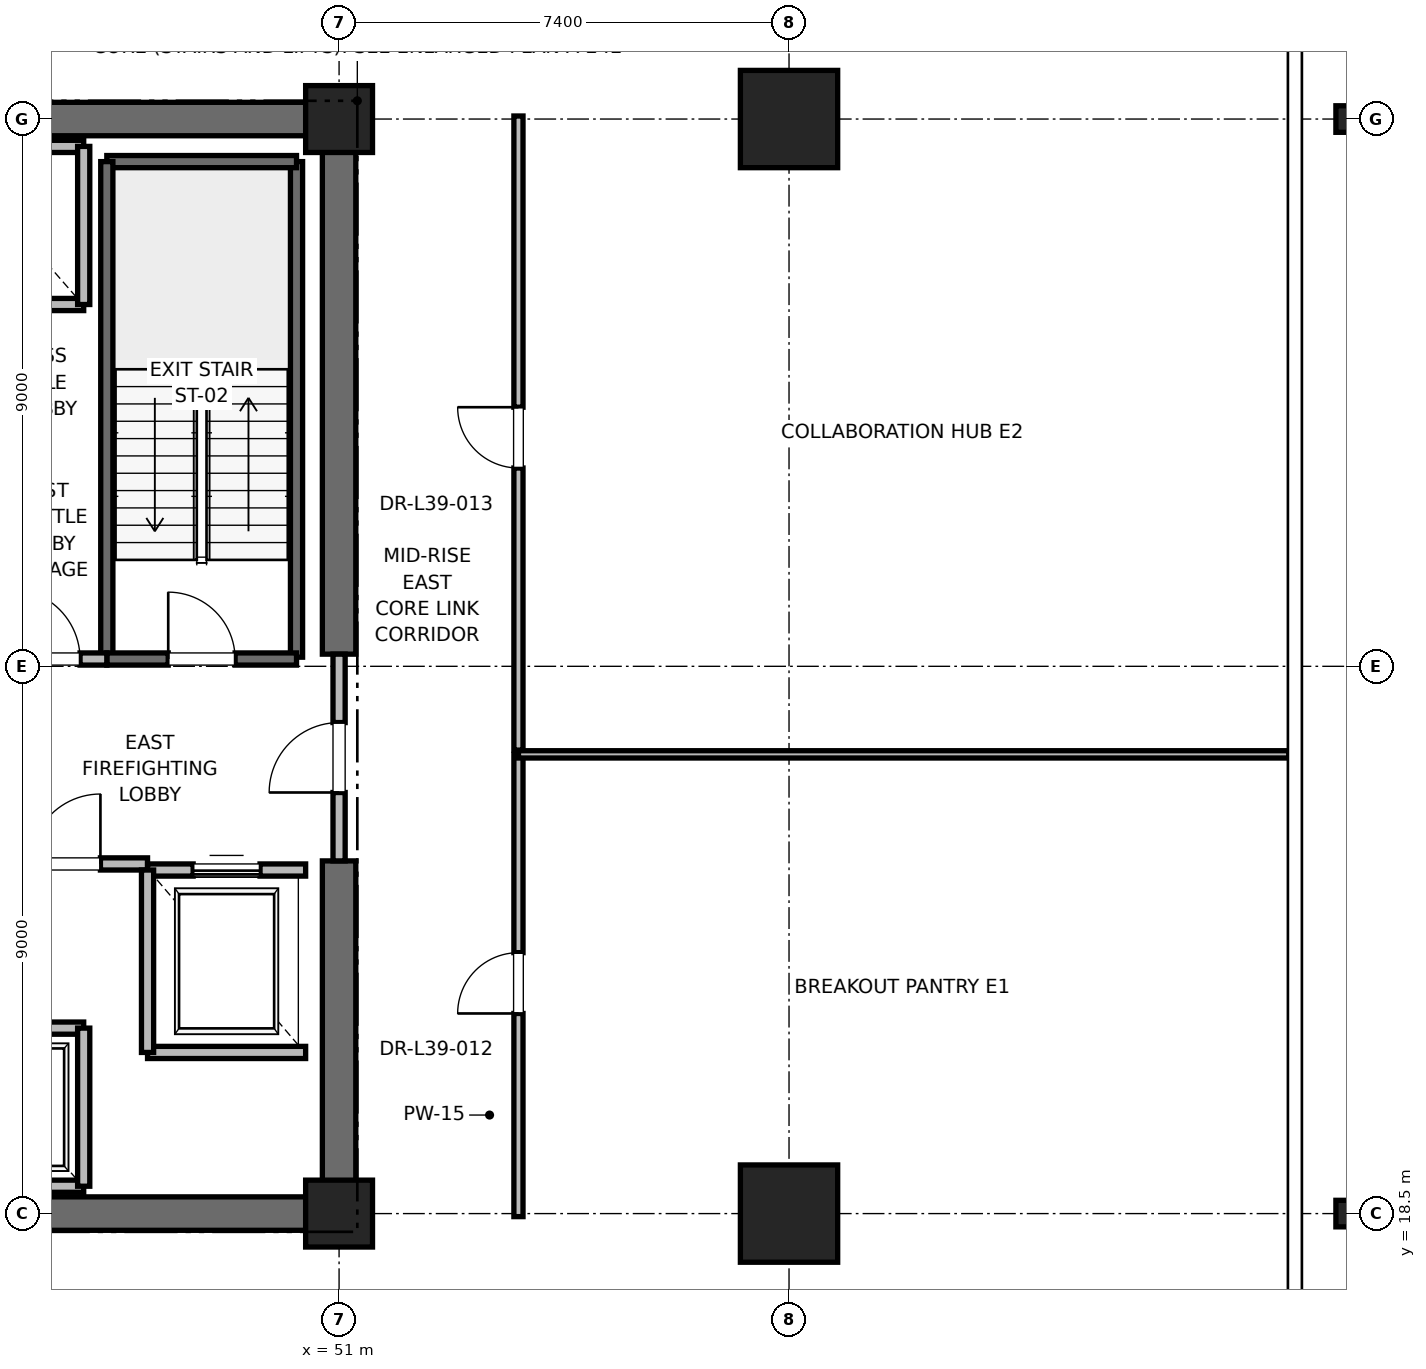
"""IFC4 building model, lengths in metres.
Left out: names, types, materials, properties, quantities, classifications, styles, units other than length and angle.
Written with IfcOpenShell. Run it as: python <this file> out.ifc"""

import sys

from ifc_helpers import new_model, si_unit, direction, frame, frame_2d, origin, origin_2d, place, context, subcontext, project, spatial, rectangle, i_section, extrude, element, fill, save


model = new_model("IFC4")
c1 = context("Model", 3, precision=1e-05, world=origin(), true_north=direction((0.0, 1.0)))
c2 = subcontext(c1, "Body", "Model", "MODEL_VIEW")
j1 = project(units=[si_unit("LENGTHUNIT", "METRE"), si_unit("PLANEANGLEUNIT", "RADIAN")], contexts=[c1])
p1 = place(None, origin())
s1 = spatial("IfcSite", under=j1, at=p1, CompositionType="ELEMENT")
p2 = place(p1, origin())
s2 = spatial("IfcBuilding", under=s1, at=p2, CompositionType="ELEMENT")
p3 = place(p2, frame((0.0, 0.0, 168.4)))
s3 = spatial("IfcBuildingStorey", under=s2, at=p3, CompositionType="ELEMENT", Elevation=168.4)
for number, where, z_axis, x_axis in (
    (1, (58.4, 18.5, 0.0), (0.0, 0.0, 1.0), (1.0, 0.0, 0.0)),
    (2, (58.4, 36.5, 0.0), (0.0, 0.0, 1.0), (1.0, 0.0, 0.0)),
):
    element("IfcColumn", number, at=place(p3, frame(where, z_axis=z_axis, x_axis=x_axis)), inside=s3, PredefinedType="COLUMN", context=c2, shape_type="SweptSolid", body=[
        extrude(rectangle(XDim=1.6, YDim=1.6, at=origin_2d()), origin(), (0.0, 0.0, 1.0), 4.0),
    ])
for number, where, z_axis, x_axis in (
    (3, (67.6, 18.5, 0.0), (0.0, 0.0, 1.0), (1.0, 0.0, 0.0)),
    (4, (67.6, 36.5, 0.0), (0.0, 0.0, 1.0), (1.0, 0.0, 0.0)),
):
    element("IfcColumn", number, at=place(p3, frame(where, z_axis=z_axis, x_axis=x_axis)), inside=s3, PredefinedType="COLUMN", context=c2, shape_type="SweptSolid", body=[
        extrude(i_section(OverallWidth=0.412, OverallDepth=0.437, WebThickness=0.036, FlangeThickness=0.058, FilletRadius=0.015, at=origin_2d()), origin(), (0.0, 0.0, 1.0), 4.0),
    ])
for number, where, z_axis, x_axis in (
    (5, (51.0, 18.5, 0.0), (0.0, 0.0, 1.0), (1.0, 0.0, 0.0)),
    (6, (51.0, 36.5, 0.0), (0.0, 0.0, 1.0), (1.0, 0.0, 0.0)),
):
    element("IfcColumn", number, at=place(p3, frame(where, z_axis=z_axis, x_axis=x_axis)), inside=s3, PredefinedType="PILASTER", context=c2, shape_type="SweptSolid", body=[
        extrude(rectangle(XDim=1.1, YDim=1.1, at=origin_2d()), origin(), (0.0, 0.0, 1.0), 4.0),
    ])
p4 = place(p3, frame((41.8, 18.5, 0.0), z_axis=(0.0, 0.0, 1.0), x_axis=(1.0, 0.0, 0.0)))
e7 = element("IfcWall", 7, at=p4, inside=s3, PredefinedType="SHEAR", context=c2, shape_type="SweptSolid", body=[
    extrude(rectangle(XDim=9.2, YDim=0.55, at=frame_2d((4.6, 0.0))), origin(), (0.0, 0.0, 1.0), 3.775),
])
for number, where, z_axis, x_axis in (
    (8, (45.2, 36.5, 0.0), (0.0, 0.0, 1.0), (1.0, 0.0, 0.0)),
    (9, (51.0, 18.5, 0.0), (0.0, 0.0, 1.0), (0.0, 1.0, 0.0)),
):
    element("IfcWall", number, at=place(p3, frame(where, z_axis=z_axis, x_axis=x_axis)), inside=s3, PredefinedType="SHEAR", context=c2, shape_type="SweptSolid", body=[
        extrude(rectangle(XDim=5.8, YDim=0.55, at=frame_2d((2.9, 0.0))), origin(), (0.0, 0.0, 1.0), 3.775),
    ])
p5 = place(p3, frame((51.0, 27.7, 0.0), z_axis=(0.0, 0.0, 1.0), x_axis=(0.0, 1.0, 0.0)))
e10 = element("IfcWall", 10, at=p5, inside=s3, PredefinedType="SHEAR", context=c2, shape_type="SweptSolid", body=[
    extrude(rectangle(XDim=8.8, YDim=0.55, at=frame_2d((4.4, 0.0))), origin(), (0.0, 0.0, 1.0), 3.775),
])
p6 = place(p3, frame((50.3, 27.65, 0.0), z_axis=(0.0, 0.0, 1.0), x_axis=(0.0, 1.0, 0.0)))
e11 = element("IfcWall", 11, at=p6, inside=s3, PredefinedType="SOLIDWALL", context=c2, shape_type="SweptSolid", body=[
    extrude(rectangle(XDim=8.15, YDim=0.2, at=frame_2d((4.075, 0.0))), origin(), (0.0, 0.0, 1.0), 3.775),
])
p7 = place(p3, frame((47.18, 35.8, 0.0), z_axis=(0.0, 0.0, 1.0), x_axis=(1.0, 0.0, 0.0)))
e12 = element("IfcWall", 12, at=p7, inside=s3, PredefinedType="SOLIDWALL", context=c2, shape_type="SweptSolid", body=[
    extrude(rectangle(XDim=3.12, YDim=0.2, at=frame_2d((1.56, 0.0))), origin(), (0.0, 0.0, 1.0), 3.775),
])
p8 = place(p3, frame((47.18, 27.62, 0.0), z_axis=(0.0, 0.0, 1.0), x_axis=(0.0, 1.0, 0.0)))
e13 = element("IfcWall", 13, at=p8, inside=s3, PredefinedType="SOLIDWALL", context=c2, shape_type="SweptSolid", body=[
    extrude(rectangle(XDim=8.18, YDim=0.2, at=frame_2d((4.09, 0.0))), origin(), (0.0, 0.0, 1.0), 3.775),
])
p9 = place(p3, frame((47.18, 27.62, 0.0), z_axis=(0.0, 0.0, 1.0), x_axis=(1.0, 0.0, 0.0)))
e14 = element("IfcWall", 14, at=p9, inside=s3, PredefinedType="SOLIDWALL", context=c2, shape_type="SweptSolid", body=[
    extrude(rectangle(XDim=3.12, YDim=0.2, at=frame_2d((1.56, 0.0))), origin(), (0.0, 0.0, 1.0), 3.775),
])
p10 = place(p9, frame((1.01, 0.0, 0.0)))
e15 = element("IfcOpeningElement", 15, at=p10, cuts=e14, PredefinedType="OPENING", context=c2, shape_type="SweptSolid", body=[
    extrude(rectangle(XDim=1.1, YDim=2.15, at=frame_2d((0.55, 1.075))), frame((0.0, 0.1, 0.0), z_axis=(0.0, -1.0, 0.0), x_axis=(1.0, 0.0, 0.0)), (0.0, 0.0, 1.0), 0.2),
])
p11 = place(p3, frame((45.15, 24.25, 0.0), z_axis=(0.0, 0.0, 1.0), x_axis=(1.0, 0.0, 0.0)))
e16 = element("IfcWall", 16, at=p11, inside=s3, PredefinedType="PARTITIONING", context=c2, shape_type="SweptSolid", body=[
    extrude(rectangle(XDim=2.7, YDim=0.2, at=frame_2d((1.35, 0.0))), origin(), (0.0, 0.0, 1.0), 3.775),
])
p12 = place(p11, frame((0.775, 0.0, 0.0)))
e17 = element("IfcOpeningElement", 17, at=p12, cuts=e16, PredefinedType="OPENING", context=c2, shape_type="SweptSolid", body=[
    extrude(rectangle(XDim=1.15, YDim=2.2, at=frame_2d((0.575, 1.1))), frame((0.0, 0.1, 0.0), z_axis=(0.0, -1.0, 0.0), x_axis=(1.0, 0.0, 0.0)), (0.0, 0.0, 1.0), 0.2),
])
p13 = place(p3, frame((45.15, 27.62, 0.0), z_axis=(0.0, 0.0, 1.0), x_axis=(1.0, 0.0, 0.0)))
e18 = element("IfcWall", 18, at=p13, inside=s3, PredefinedType="PARTITIONING", context=c2, shape_type="SweptSolid", body=[
    extrude(rectangle(XDim=2.03, YDim=0.2, at=frame_2d((1.015, 0.0))), origin(), (0.0, 0.0, 1.0), 3.775),
])
p14 = place(p13, frame((0.44, 0.0, 0.0)))
e19 = element("IfcOpeningElement", 19, at=p14, cuts=e18, PredefinedType="OPENING", context=c2, shape_type="SweptSolid", body=[
    extrude(rectangle(XDim=1.15, YDim=2.2, at=frame_2d((0.575, 1.1))), frame((0.0, 0.1, 0.0), z_axis=(0.0, -1.0, 0.0), x_axis=(1.0, 0.0, 0.0)), (0.0, 0.0, 1.0), 0.2),
])
p15 = place(p3, frame((51.0, 24.3, 0.0), z_axis=(0.0, 0.0, 1.0), x_axis=(0.0, 1.0, 0.0)))
e20 = element("IfcWall", 20, at=p15, inside=s3, PredefinedType="PARTITIONING", context=c2, shape_type="SweptSolid", body=[
    extrude(rectangle(XDim=3.4, YDim=0.2, at=frame_2d((1.7, 0.0))), origin(), (0.0, 0.0, 1.0), 2.755),
])
p16 = place(p15, frame((1.125, 0.0, 0.0)))
e21 = element("IfcOpeningElement", 21, at=p16, cuts=e20, PredefinedType="OPENING", context=c2, shape_type="SweptSolid", body=[
    extrude(rectangle(XDim=1.15, YDim=2.2, at=frame_2d((0.575, 1.1))), frame((0.0, 0.1, 0.0), z_axis=(0.0, -1.0, 0.0), x_axis=(1.0, 0.0, 0.0)), (0.0, 0.0, 1.0), 0.2),
])
p17 = place(p3, frame((47.85, 21.15, 0.0), z_axis=(0.0, 0.0, 1.0), x_axis=(1.0, 0.0, 0.0)))
e22 = element("IfcWall", 22, at=p17, inside=s3, PredefinedType="SOLIDWALL", context=c2, shape_type="SweptSolid", body=[
    extrude(rectangle(XDim=2.6, YDim=0.2, at=frame_2d((1.3, 0.0))), origin(), (0.0, 0.0, 1.0), 3.775),
])
p18 = place(p3, frame((50.45, 24.15, 0.0), z_axis=(0.0, 0.0, 1.0), x_axis=(-1.0, 0.0, 0.0)))
e23 = element("IfcWall", 23, at=p18, inside=s3, PredefinedType="SOLIDWALL", context=c2, shape_type="SweptSolid", body=[
    extrude(rectangle(XDim=2.6, YDim=0.2, at=frame_2d((1.3, 0.0))), origin(), (0.0, 0.0, 1.0), 2.755),
])
p19 = place(p18, frame((0.75, 0.0, 0.0)))
e24 = element("IfcOpeningElement", 24, at=p19, cuts=e23, PredefinedType="OPENING", context=c2, shape_type="SweptSolid", body=[
    extrude(rectangle(XDim=1.1, YDim=2.2, at=frame_2d((0.55, 1.1))), frame((0.0, 0.1, 0.0), z_axis=(0.0, -1.0, 0.0), x_axis=(1.0, 0.0, 0.0)), (0.0, 0.0, 1.0), 0.2),
])
p20 = place(p3, frame((47.85, 24.15, 0.0), z_axis=(0.0, 0.0, 1.0), x_axis=(0.0, -1.0, 0.0)))
e25 = element("IfcWall", 25, at=p20, inside=s3, PredefinedType="SOLIDWALL", context=c2, shape_type="SweptSolid", body=[
    extrude(rectangle(XDim=3.0, YDim=0.2, at=frame_2d((1.5, 0.0))), origin(), (0.0, 0.0, 1.0), 3.775),
])
p21 = place(p3, frame((44.5, 18.95, 0.0), z_axis=(0.0, 0.0, 1.0), x_axis=(1.0, 0.0, 0.0)))
e26 = element("IfcWall", 26, at=p21, inside=s3, PredefinedType="SOLIDWALL", context=c2, shape_type="SweptSolid", body=[
    extrude(rectangle(XDim=2.3, YDim=0.2, at=frame_2d((1.15, 0.0))), origin(), (0.0, 0.0, 1.0), 3.775),
])
p22 = place(p3, frame((46.8, 21.55, 0.0), z_axis=(0.0, 0.0, 1.0), x_axis=(-1.0, 0.0, 0.0)))
e27 = element("IfcWall", 27, at=p22, inside=s3, PredefinedType="SOLIDWALL", context=c2, shape_type="SweptSolid", body=[
    extrude(rectangle(XDim=2.3, YDim=0.2, at=frame_2d((1.15, 0.0))), origin(), (0.0, 0.0, 1.0), 3.775),
])
p23 = place(p22, frame((0.6, 0.0, 0.0)))
e28 = element("IfcOpeningElement", 28, at=p23, cuts=e27, PredefinedType="OPENING", context=c2, shape_type="SweptSolid", body=[
    extrude(rectangle(XDim=1.1, YDim=2.2, at=frame_2d((0.55, 1.1))), frame((0.0, 0.1, 0.0), z_axis=(0.0, -1.0, 0.0), x_axis=(1.0, 0.0, 0.0)), (0.0, 0.0, 1.0), 0.2),
])
p24 = place(p3, frame((46.8, 18.95, 0.0), z_axis=(0.0, 0.0, 1.0), x_axis=(0.0, 1.0, 0.0)))
e29 = element("IfcWall", 29, at=p24, inside=s3, PredefinedType="SOLIDWALL", context=c2, shape_type="SweptSolid", body=[
    extrude(rectangle(XDim=2.6, YDim=0.2, at=frame_2d((1.3, 0.0))), origin(), (0.0, 0.0, 1.0), 3.775),
])
p25 = place(p3, frame((44.5, 33.45, 0.0), z_axis=(0.0, 0.0, 1.0), x_axis=(1.0, 0.0, 0.0)))
e30 = element("IfcWall", 30, at=p25, inside=s3, PredefinedType="SOLIDWALL", context=c2, shape_type="SweptSolid", body=[
    extrude(rectangle(XDim=2.3, YDim=0.2, at=frame_2d((1.15, 0.0))), origin(), (0.0, 0.0, 1.0), 3.775),
])
p26 = place(p3, frame((46.8, 36.05, 0.0), z_axis=(0.0, 0.0, 1.0), x_axis=(-1.0, 0.0, 0.0)))
e31 = element("IfcWall", 31, at=p26, inside=s3, PredefinedType="SOLIDWALL", context=c2, shape_type="SweptSolid", body=[
    extrude(rectangle(XDim=2.3, YDim=0.2, at=frame_2d((1.15, 0.0))), origin(), (0.0, 0.0, 1.0), 2.755),
])
p27 = place(p3, frame((46.8, 33.45, 0.0), z_axis=(0.0, 0.0, 1.0), x_axis=(0.0, 1.0, 0.0)))
e32 = element("IfcWall", 32, at=p27, inside=s3, PredefinedType="SOLIDWALL", context=c2, shape_type="SweptSolid", body=[
    extrude(rectangle(XDim=2.6, YDim=0.2, at=frame_2d((1.3, 0.0))), origin(), (0.0, 0.0, 1.0), 3.775),
])
p28 = place(p3, frame((53.95, 18.45, 0.0), z_axis=(0.0, 0.0, 1.0), x_axis=(0.0, 1.0, 0.0)))
e33 = element("IfcWall", 33, at=p28, inside=s3, PredefinedType="PARTITIONING", context=c2, shape_type="SweptSolid", body=[
    extrude(rectangle(XDim=7.602, YDim=0.15, at=frame_2d((3.801, 0.0))), origin(), (0.0, 0.0, 1.0), 2.85),
])
p29 = place(p28, frame((3.341, 0.0, 0.0)))
e34 = element("IfcOpeningElement", 34, at=p29, cuts=e33, PredefinedType="OPENING", context=c2, shape_type="SweptSolid", body=[
    extrude(rectangle(XDim=1.0, YDim=2.15, at=frame_2d((0.5, 1.075))), frame((0.0, 0.075, 0.0), z_axis=(0.0, -1.0, 0.0), x_axis=(1.0, 0.0, 0.0)), (0.0, 0.0, 1.0), 0.15),
])
p30 = place(p3, frame((53.95, 26.052, 0.0), z_axis=(0.0, 0.0, 1.0), x_axis=(1.0, 0.0, 0.0)))
e35 = element("IfcWall", 35, at=p30, inside=s3, PredefinedType="PARTITIONING", context=c2, shape_type="SweptSolid", body=[
    extrude(rectangle(XDim=12.67, YDim=0.12, at=frame_2d((6.335, 0.0))), origin(), (0.0, 0.0, 1.0), 2.85),
])
p31 = place(p3, frame((53.95, 26.122, 0.0), z_axis=(0.0, 0.0, 1.0), x_axis=(0.0, 1.0, 0.0)))
e36 = element("IfcWall", 36, at=p31, inside=s3, PredefinedType="PARTITIONING", context=c2, shape_type="SweptSolid", body=[
    extrude(rectangle(XDim=10.428, YDim=0.15, at=frame_2d((5.214, 0.0))), origin(), (0.0, 0.0, 1.0), 2.85),
])
p32 = place(p31, frame((4.639, 0.0, 0.0)))
e37 = element("IfcOpeningElement", 37, at=p32, cuts=e36, PredefinedType="OPENING", context=c2, shape_type="SweptSolid", body=[
    extrude(rectangle(XDim=1.0, YDim=2.15, at=frame_2d((0.5, 1.075))), frame((0.0, 0.075, 0.0), z_axis=(0.0, -1.0, 0.0), x_axis=(1.0, 0.0, 0.0)), (0.0, 0.0, 1.0), 0.15),
])
p33 = place(p10, origin())
e38 = element("IfcDoor", 38, at=p33, inside=s3, OperationType="SINGLE_SWING_LEFT", PredefinedType="DOOR", context=c2, shape_type="SweptSolid", body=[
    extrude(rectangle(XDim=1.1, YDim=2.15, at=frame_2d((0.55, 1.075))), frame((0.0, 0.025, 0.0), z_axis=(0.0, -1.0, 0.0), x_axis=(1.0, 0.0, 0.0)), (0.0, 0.0, 1.0), 0.05),
])
fill(e15, e38)
p34 = place(p12, origin())
e39 = element("IfcDoor", 39, at=p34, inside=s3, OperationType="SINGLE_SWING_RIGHT", PredefinedType="DOOR", context=c2, shape_type="SweptSolid", body=[
    extrude(rectangle(XDim=1.15, YDim=2.2, at=frame_2d((0.575, 1.1))), frame((0.0, 0.025, 0.0), z_axis=(0.0, -1.0, 0.0), x_axis=(1.0, 0.0, 0.0)), (0.0, 0.0, 1.0), 0.05),
])
fill(e17, e39)
p35 = place(p14, origin())
e40 = element("IfcDoor", 40, at=p35, inside=s3, OperationType="SINGLE_SWING_LEFT", PredefinedType="DOOR", context=c2, shape_type="SweptSolid", body=[
    extrude(rectangle(XDim=1.15, YDim=2.2, at=frame_2d((0.575, 1.1))), frame((0.0, 0.025, 0.0), z_axis=(0.0, -1.0, 0.0), x_axis=(1.0, 0.0, 0.0)), (0.0, 0.0, 1.0), 0.05),
])
fill(e19, e40)
p36 = place(p16, origin())
e41 = element("IfcDoor", 41, at=p36, inside=s3, OperationType="SINGLE_SWING_LEFT", PredefinedType="DOOR", context=c2, shape_type="SweptSolid", body=[
    extrude(rectangle(XDim=1.15, YDim=2.2, at=frame_2d((0.575, 1.1))), frame((0.0, 0.025, 0.0), z_axis=(0.0, -1.0, 0.0), x_axis=(1.0, 0.0, 0.0)), (0.0, 0.0, 1.0), 0.05),
])
fill(e21, e41)
p37 = place(p19, origin())
e42 = element("IfcDoor", 42, at=p37, inside=s3, OperationType="SLIDING_TO_RIGHT", PredefinedType="DOOR", context=c2, shape_type="SweptSolid", body=[
    extrude(rectangle(XDim=1.1, YDim=2.2, at=frame_2d((0.55, 1.1))), frame((0.0, 0.025, 0.0), z_axis=(0.0, -1.0, 0.0), x_axis=(1.0, 0.0, 0.0)), (0.0, 0.0, 1.0), 0.05),
])
fill(e24, e42)
p38 = place(p29, origin())
e43 = element("IfcDoor", 43, at=p38, inside=s3, OperationType="SINGLE_SWING_LEFT", PredefinedType="DOOR", context=c2, shape_type="SweptSolid", body=[
    extrude(rectangle(XDim=1.0, YDim=2.15, at=frame_2d((0.5, 1.075))), frame((0.0, 0.025, 0.0), z_axis=(0.0, -1.0, 0.0), x_axis=(1.0, 0.0, 0.0)), (0.0, 0.0, 1.0), 0.05),
])
fill(e34, e43)
p39 = place(p32, origin())
e44 = element("IfcDoor", 44, at=p39, inside=s3, OperationType="SINGLE_SWING_RIGHT", PredefinedType="DOOR", context=c2, shape_type="SweptSolid", body=[
    extrude(rectangle(XDim=1.0, YDim=2.15, at=frame_2d((0.5, 1.075))), frame((0.0, 0.025, 0.0), z_axis=(0.0, -1.0, 0.0), x_axis=(1.0, 0.0, 0.0)), (0.0, 0.0, 1.0), 0.05),
])
fill(e37, e44)
save(model, sys.argv[1])
